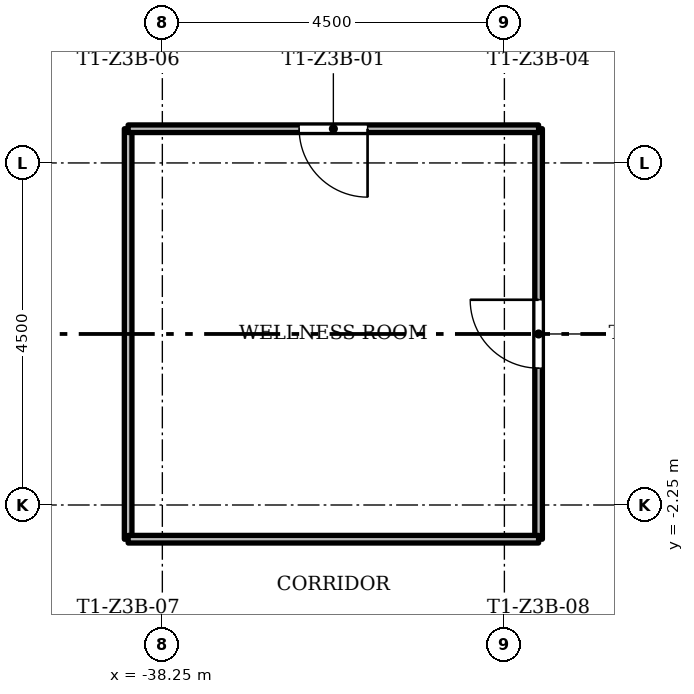
"""IFC4 building model, lengths in metres.
Left out: names, types, materials, properties, quantities, classifications, styles, units other than length and angle.
Written with IfcOpenShell. Run it as: python <this file> out.ifc"""

import sys

from ifc_helpers import new_model, si_unit, direction, frame, frame_2d, origin, place, context, subcontext, project, spatial, rectangle, extrude, element, fill, save


model = new_model("IFC4")
c1 = context("Model", 3, precision=1e-05, world=origin(), true_north=direction((0.0, 1.0)))
c2 = subcontext(c1, "Body", "Model", "MODEL_VIEW")
j1 = project(units=[si_unit("LENGTHUNIT", "METRE"), si_unit("PLANEANGLEUNIT", "RADIAN")], contexts=[c1])
p1 = place(None, origin())
s1 = spatial("IfcSite", under=j1, at=p1, CompositionType="ELEMENT")
p2 = place(p1, origin())
s2 = spatial("IfcBuilding", under=s1, at=p2, CompositionType="ELEMENT")
p3 = place(p2, frame((0.0, 0.0, 147.3)))
s3 = spatial("IfcBuildingStorey", under=s2, at=p3, CompositionType="ELEMENT", Elevation=147.3)
p4 = place(p3, frame((-38.7, -2.7, 0.0), z_axis=(0.0, 0.0, 1.0), x_axis=(0.0, 1.0, 0.0)))
e1 = element("IfcWall", 1, at=p4, inside=s3, PredefinedType="PARTITIONING", context=c2, shape_type="SweptSolid", body=[
    extrude(rectangle(XDim=5.4, YDim=0.1, at=frame_2d((2.7, 0.0))), origin(), (0.0, 0.0, 1.0), 3.0),
])
p5 = place(p3, frame((-33.3, -2.7, 0.0), z_axis=(0.0, 0.0, 1.0), x_axis=(0.0, 1.0, 0.0)))
e2 = element("IfcWall", 2, at=p5, inside=s3, PredefinedType="PARTITIONING", context=c2, shape_type="SweptSolid", body=[
    extrude(rectangle(XDim=5.4, YDim=0.1, at=frame_2d((2.7, 0.0))), origin(), (0.0, 0.0, 1.0), 3.0),
])
p6 = place(p5, frame((2.25, 0.0, 0.0)))
e3 = element("IfcOpeningElement", 3, at=p6, cuts=e2, PredefinedType="OPENING", context=c2, shape_type="SweptSolid", body=[
    extrude(rectangle(XDim=0.9, YDim=2.1, at=frame_2d((0.45, 1.05))), frame((0.0, 0.06, 0.0), z_axis=(0.0, -1.0, 0.0), x_axis=(1.0, 0.0, 0.0)), (0.0, 0.0, 1.0), 0.12),
])
p7 = place(p3, frame((-38.7, -2.7, 0.0), z_axis=(0.0, 0.0, 1.0), x_axis=(1.0, 0.0, 0.0)))
e4 = element("IfcWall", 4, at=p7, inside=s3, PredefinedType="PARTITIONING", context=c2, shape_type="SweptSolid", body=[
    extrude(rectangle(XDim=5.4, YDim=0.1, at=frame_2d((2.7, 0.0))), origin(), (0.0, 0.0, 1.0), 3.0),
])
p8 = place(p3, frame((-38.7, 2.7, 0.0), z_axis=(0.0, 0.0, 1.0), x_axis=(1.0, 0.0, 0.0)))
e5 = element("IfcWall", 5, at=p8, inside=s3, PredefinedType="PARTITIONING", context=c2, shape_type="SweptSolid", body=[
    extrude(rectangle(XDim=5.4, YDim=0.1, at=frame_2d((2.7, 0.0))), origin(), (0.0, 0.0, 1.0), 3.0),
])
p9 = place(p8, frame((2.25, 0.0, 0.0)))
e6 = element("IfcOpeningElement", 6, at=p9, cuts=e5, PredefinedType="OPENING", context=c2, shape_type="SweptSolid", body=[
    extrude(rectangle(XDim=0.9, YDim=2.1, at=frame_2d((0.45, 1.05))), frame((0.0, 0.06, 0.0), z_axis=(0.0, -1.0, 0.0), x_axis=(1.0, 0.0, 0.0)), (0.0, 0.0, 1.0), 0.12),
])
p10 = place(p9, origin())
e7 = element("IfcDoor", 7, at=p10, inside=s3, OperationType="SINGLE_SWING_RIGHT", PredefinedType="DOOR", context=c2, shape_type="SweptSolid", body=[
    extrude(rectangle(XDim=0.9, YDim=2.1, at=frame_2d((0.45, 1.05))), frame((0.0, 0.025, 0.0), z_axis=(0.0, -1.0, 0.0), x_axis=(1.0, 0.0, 0.0)), (0.0, 0.0, 1.0), 0.05),
])
fill(e6, e7)
p11 = place(p6, origin())
e8 = element("IfcDoor", 8, at=p11, inside=s3, OperationType="SINGLE_SWING_LEFT", PredefinedType="DOOR", context=c2, shape_type="SweptSolid", body=[
    extrude(rectangle(XDim=0.9, YDim=2.1, at=frame_2d((0.45, 1.05))), frame((0.0, 0.025, 0.0), z_axis=(0.0, -1.0, 0.0), x_axis=(1.0, 0.0, 0.0)), (0.0, 0.0, 1.0), 0.05),
])
fill(e3, e8)
save(model, sys.argv[1])
